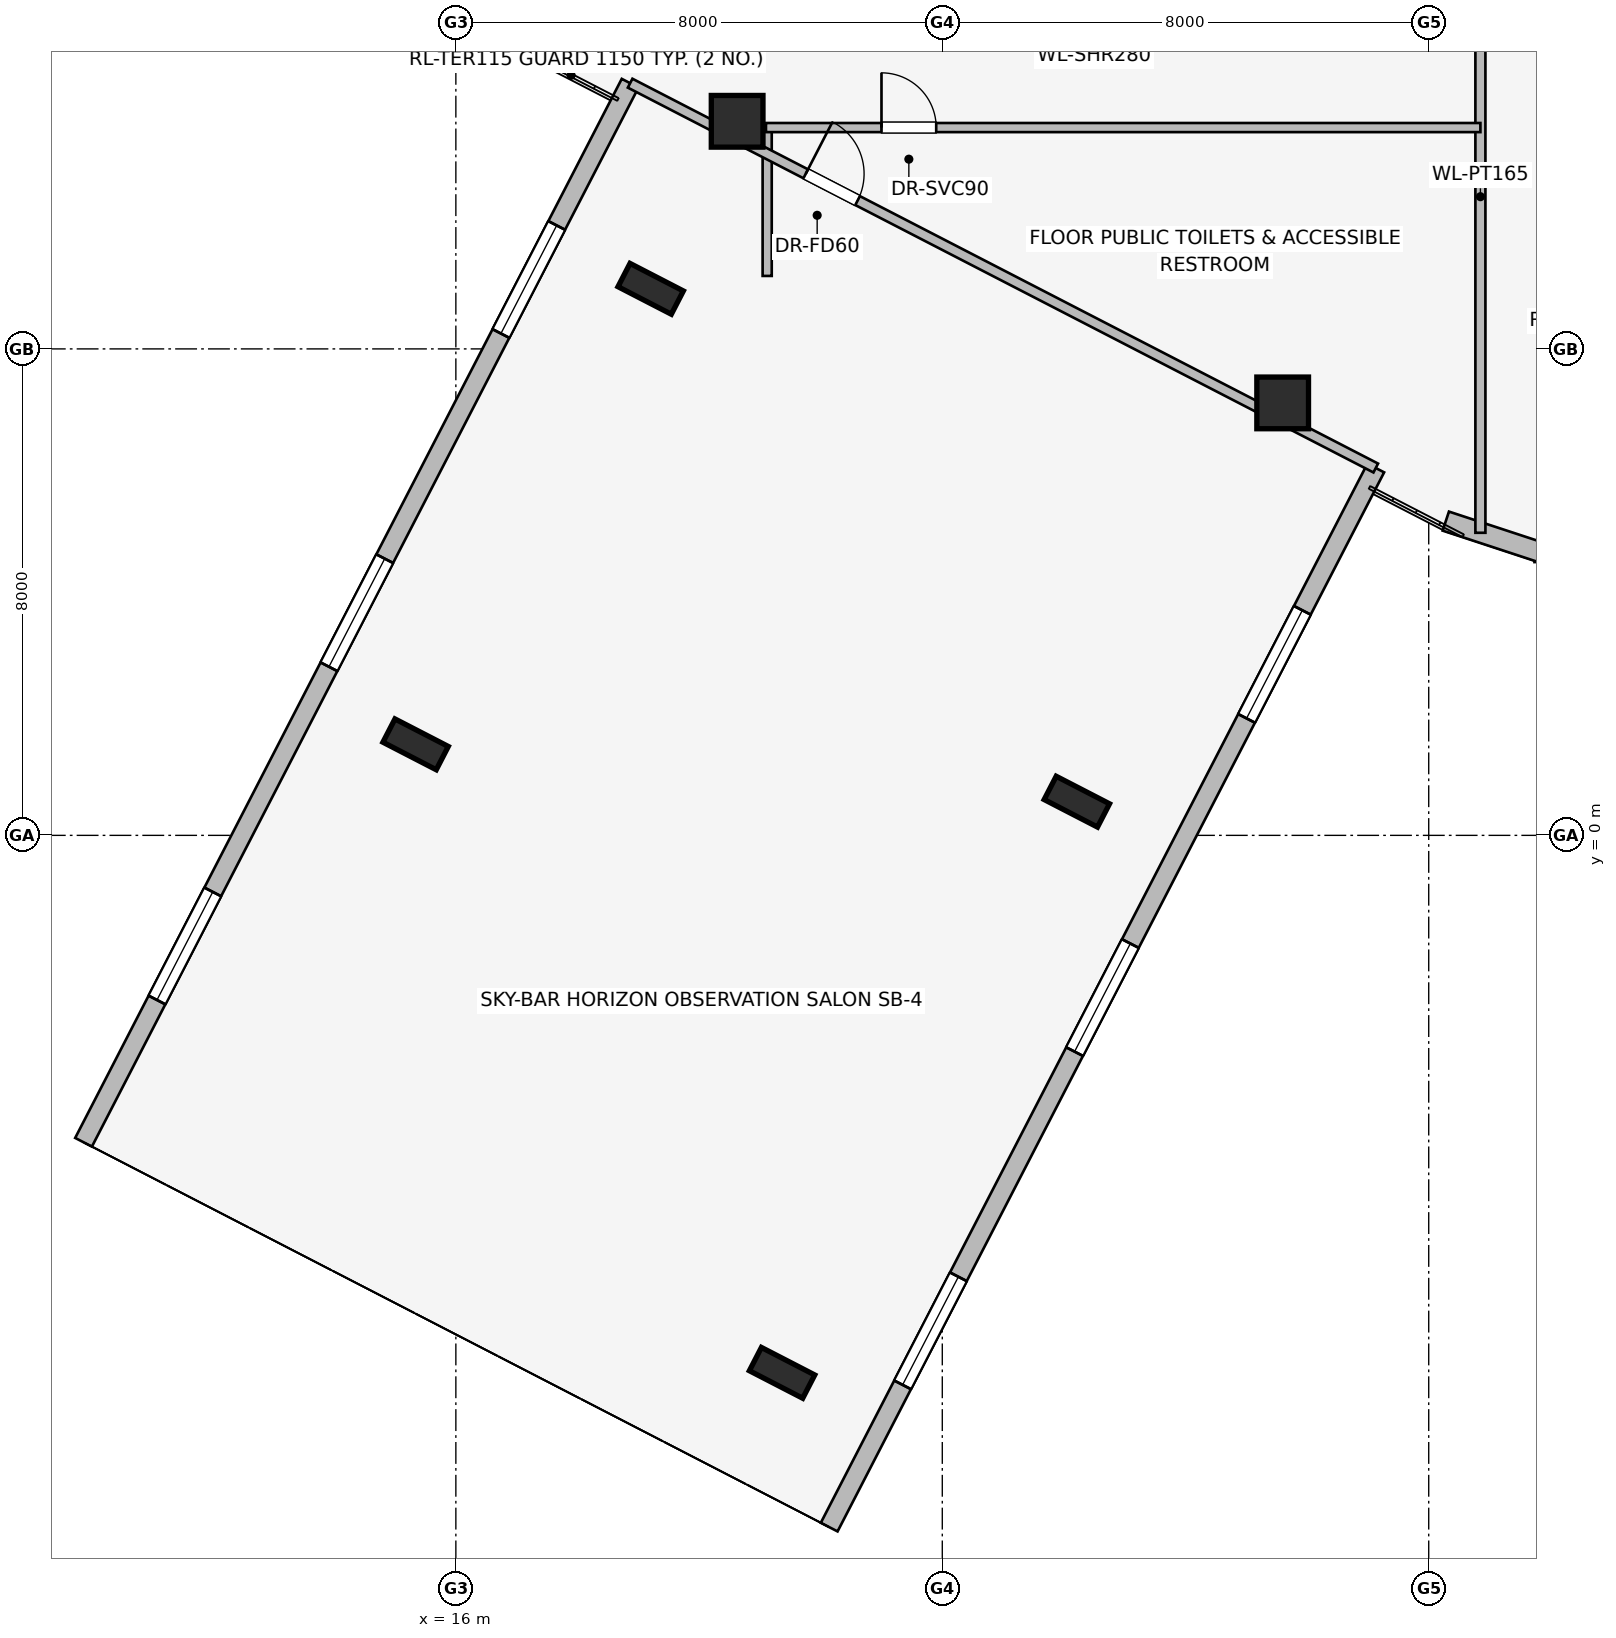
"""IFC4 building model, lengths in metres.
Left out: names, types, materials, properties, quantities, classifications, styles, units other than length and angle.
Written with IfcOpenShell. Run it as: python <this file> out.ifc"""

import sys

from ifc_helpers import new_model, si_unit, direction, frame, frame_2d, origin, origin_2d, place, context, subcontext, project, spatial, rectangle, i_section, extrude, element, fill, save


model = new_model("IFC4")
c1 = context("Model", 3, precision=1e-05, world=origin(), true_north=direction((0.0, 1.0)))
c2 = subcontext(c1, "Body", "Model", "MODEL_VIEW")
j1 = project(units=[si_unit("LENGTHUNIT", "METRE"), si_unit("PLANEANGLEUNIT", "RADIAN")], contexts=[c1])
p1 = place(None, origin())
s1 = spatial("IfcSite", under=j1, at=p1, CompositionType="ELEMENT")
p2 = place(p1, origin())
s2 = spatial("IfcBuilding", under=s1, at=p2, CompositionType="ELEMENT")
p3 = place(p2, frame((0.0, 0.0, 180.9)))
s3 = spatial("IfcBuildingStorey", under=s2, at=p3, CompositionType="ELEMENT", Elevation=180.9)
for number, where, z_axis, x_axis in (
    (1, (20.626, 11.743, 0.0), (0.0, 0.0, 1.0), (1.0, 0.0, 0.0)),
    (2, (29.598, 7.112, 0.0), (0.0, 0.0, 1.0), (1.0, 0.0, 0.0)),
):
    element("IfcColumn", number, at=place(p3, frame(where, z_axis=z_axis, x_axis=x_axis)), inside=s3, PredefinedType="COLUMN", context=c2, shape_type="SweptSolid", body=[
        extrude(rectangle(XDim=0.85, YDim=0.85, at=origin_2d()), origin(), (0.0, 0.0, 1.0), 3.45),
    ])
for number, where, z_axis, x_axis in (
    (3, (19.204, 8.988, 0.0), (0.0, 0.0, 1.0), (-0.459, -0.889, 0.0)),
    (4, (26.213, 0.554, 0.0), (0.0, 0.0, 1.0), (-0.459, -0.889, 0.0)),
    (5, (15.338, 1.497, 0.0), (0.0, 0.0, 1.0), (-0.459, -0.889, 0.0)),
    (6, (21.365, -8.839, 0.0), (0.0, 0.0, 1.0), (-0.459, -0.889, 0.0)),
):
    element("IfcColumn", number, at=place(p3, frame(where, z_axis=z_axis, x_axis=x_axis)), inside=s3, PredefinedType="COLUMN", context=c2, shape_type="SweptSolid", body=[
        extrude(i_section(OverallWidth=0.431, OverallDepth=0.987, WebThickness=0.034, FlangeThickness=0.062, at=origin_2d()), origin(), (0.0, 0.0, 1.0), 3.45),
    ])
p4 = place(p3, frame((17.489, 12.8, 0.0), z_axis=(0.0, 0.0, 1.0), x_axis=(-0.791409877269, 0.611285862884, 0.0)))
e7 = element("IfcWall", 7, at=p4, inside=s3, PredefinedType="STANDARD", context=c2, shape_type="SweptSolid", body=[
    extrude(rectangle(XDim=1.677, YDim=0.33, at=frame_2d((0.838, 0.0))), origin(), (0.0, 0.0, 1.0), 3.19),
])
p5 = place(p3, frame((9.877, -5.047, 0.0), z_axis=(0.0, 0.0, 1.0), x_axis=(0.458621661341, 0.888631628825, 0.0)))
e8 = element("IfcWall", 8, at=p5, inside=s3, PredefinedType="STANDARD", context=c2, shape_type="SweptSolid", body=[
    extrude(rectangle(XDim=19.6, YDim=0.31, at=frame_2d((9.8, 0.0))), origin(), (0.0, 0.0, 1.0), 3.19),
])
p6 = place(p5, frame((2.633, 0.0, 0.75)))
e9 = element("IfcOpeningElement", 9, at=p6, cuts=e8, PredefinedType="OPENING", context=c2, shape_type="SweptSolid", body=[
    extrude(rectangle(XDim=2.0, YDim=1.5, at=frame_2d((1.0, 0.75))), frame((0.0, 0.165, 0.0), z_axis=(0.0, -1.0, 0.0), x_axis=(1.0, 0.0, 0.0)), (0.0, 0.0, 1.0), 0.33),
])
p7 = place(p5, frame((8.8, 0.0, 0.75)))
e10 = element("IfcOpeningElement", 10, at=p7, cuts=e8, PredefinedType="OPENING", context=c2, shape_type="SweptSolid", body=[
    extrude(rectangle(XDim=2.0, YDim=1.5, at=frame_2d((1.0, 0.75))), frame((0.0, 0.165, 0.0), z_axis=(0.0, -1.0, 0.0), x_axis=(1.0, 0.0, 0.0)), (0.0, 0.0, 1.0), 0.33),
])
p8 = place(p5, frame((14.967, 0.0, 0.75)))
e11 = element("IfcOpeningElement", 11, at=p8, cuts=e8, PredefinedType="OPENING", context=c2, shape_type="SweptSolid", body=[
    extrude(rectangle(XDim=2.0, YDim=1.5, at=frame_2d((1.0, 0.75))), frame((0.0, 0.165, 0.0), z_axis=(0.0, -1.0, 0.0), x_axis=(1.0, 0.0, 0.0)), (0.0, 0.0, 1.0), 0.33),
])
p9 = place(p3, frame((31.129, 6.041, 0.0), z_axis=(0.0, 0.0, 1.0), x_axis=(-0.458626737826, -0.88862900884, 0.0)))
e12 = element("IfcWall", 12, at=p9, inside=s3, PredefinedType="STANDARD", context=c2, shape_type="SweptSolid", body=[
    extrude(rectangle(XDim=19.6, YDim=0.31, at=frame_2d((9.8, 0.0))), origin(), (0.0, 0.0, 1.0), 3.19),
])
p10 = place(p9, frame((2.633, 0.0, 0.75)))
e13 = element("IfcOpeningElement", 13, at=p10, cuts=e12, PredefinedType="OPENING", context=c2, shape_type="SweptSolid", body=[
    extrude(rectangle(XDim=2.0, YDim=1.5, at=frame_2d((1.0, 0.75))), frame((0.0, 0.165, 0.0), z_axis=(0.0, -1.0, 0.0), x_axis=(1.0, 0.0, 0.0)), (0.0, 0.0, 1.0), 0.33),
])
p11 = place(p9, frame((8.8, 0.0, 0.75)))
e14 = element("IfcOpeningElement", 14, at=p11, cuts=e12, PredefinedType="OPENING", context=c2, shape_type="SweptSolid", body=[
    extrude(rectangle(XDim=2.0, YDim=1.5, at=frame_2d((1.0, 0.75))), frame((0.0, 0.165, 0.0), z_axis=(0.0, -1.0, 0.0), x_axis=(1.0, 0.0, 0.0)), (0.0, 0.0, 1.0), 0.33),
])
p12 = place(p9, frame((14.967, 0.0, 0.75)))
e15 = element("IfcOpeningElement", 15, at=p12, cuts=e12, PredefinedType="OPENING", context=c2, shape_type="SweptSolid", body=[
    extrude(rectangle(XDim=2.0, YDim=1.5, at=frame_2d((1.0, 0.75))), frame((0.0, 0.165, 0.0), z_axis=(0.0, -1.0, 0.0), x_axis=(1.0, 0.0, 0.0)), (0.0, 0.0, 1.0), 0.33),
])
p13 = place(p3, frame((35.461, 4.659, 0.0), z_axis=(0.0, 0.0, 1.0), x_axis=(-1.0, 0.0, 0.0)))
e16 = element("IfcWall", 16, at=p13, inside=s3, PredefinedType="STANDARD", context=c2, shape_type="SweptSolid", body=[
    extrude(rectangle(XDim=1.722, YDim=0.33, at=frame_2d((0.861, 0.0))), origin(), (0.0, 0.0, 1.0), 3.19),
])
p14 = place(p3, frame((33.917, 4.63, 0.0), z_axis=(0.0, 0.0, 1.0), x_axis=(-0.949937416267, 0.312440242569, 0.0)))
e17 = element("IfcWall", 17, at=p14, inside=s3, PredefinedType="STANDARD", context=c2, shape_type="SweptSolid", body=[
    extrude(rectangle(XDim=1.722, YDim=0.33, at=frame_2d((0.861, 0.0))), origin(), (0.0, 0.0, 1.0), 3.19),
])
p15 = place(p3, frame((21.12, 9.2, 0.0), z_axis=(0.0, 0.0, 1.0), x_axis=(0.0, 1.0, 0.0)))
e18 = element("IfcWall", 18, at=p15, inside=s3, PredefinedType="PARTITIONING", context=c2, shape_type="SweptSolid", body=[
    extrude(rectangle(XDim=2.48, YDim=0.15, at=frame_2d((1.24, 0.0))), origin(), (0.0, 0.0, 1.0), 3.19),
])
p16 = place(p3, frame((32.85, 4.976, 0.0), z_axis=(0.0, 0.0, 1.0), x_axis=(0.0, 1.0, 0.0)))
e19 = element("IfcWall", 19, at=p16, inside=s3, PredefinedType="PARTITIONING", context=c2, shape_type="SweptSolid", body=[
    extrude(rectangle(XDim=11.054, YDim=0.165, at=frame_2d((5.527, 0.0))), origin(), (0.0, 0.0, 1.0), 3.19),
])
p17 = place(p3, frame((21.1, 11.64, 0.0), z_axis=(0.0, 0.0, 1.0), x_axis=(1.0, 0.0, 0.0)))
e20 = element("IfcWall", 20, at=p17, inside=s3, PredefinedType="PARTITIONING", context=c2, shape_type="SweptSolid", body=[
    extrude(rectangle(XDim=11.75, YDim=0.15, at=frame_2d((5.875, 0.0))), origin(), (0.0, 0.0, 1.0), 3.19),
])
p18 = place(p17, frame((1.9, 0.0, 0.0)))
e21 = element("IfcOpeningElement", 21, at=p18, cuts=e20, PredefinedType="OPENING", context=c2, shape_type="SweptSolid", body=[
    extrude(rectangle(XDim=0.9, YDim=2.0, at=frame_2d((0.45, 1.0))), frame((0.0, 0.085, 0.0), z_axis=(0.0, -1.0, 0.0), x_axis=(1.0, 0.0, 0.0)), (0.0, 0.0, 1.0), 0.17),
])
p19 = place(p3, frame((18.866, 12.37, 0.0), z_axis=(0.0, 0.0, 1.0), x_axis=(0.888625308836, -0.458633906832, 0.0)))
e22 = element("IfcWall", 22, at=p19, inside=s3, PredefinedType="PARTITIONING", context=c2, shape_type="SweptSolid", body=[
    extrude(rectangle(XDim=13.8, YDim=0.165, at=frame_2d((6.9, 0.0))), origin(), (0.0, 0.0, 1.0), 2.641),
])
p20 = place(p19, frame((3.25, 0.0, 0.0)))
e23 = element("IfcOpeningElement", 23, at=p20, cuts=e22, PredefinedType="OPENING", context=c2, shape_type="SweptSolid", body=[
    extrude(rectangle(XDim=0.96, YDim=2.0, at=frame_2d((0.48, 1.0))), frame((0.0, 0.093, 0.0), z_axis=(0.0, -1.0, 0.0), x_axis=(1.0, 0.0, 0.0)), (0.0, 0.0, 1.0), 0.185),
])
p21 = place(p6, origin())
e24 = element("IfcWindow", 24, at=p21, inside=s3, PartitioningType="SINGLE_PANEL", PredefinedType="WINDOW", context=c2, shape_type="SweptSolid", body=[
    extrude(rectangle(XDim=2.0, YDim=1.5, at=frame_2d((1.0, 0.75))), frame((0.0, 0.03, 0.0), z_axis=(0.0, -1.0, 0.0), x_axis=(1.0, 0.0, 0.0)), (0.0, 0.0, 1.0), 0.06),
])
fill(e9, e24)
p22 = place(p7, origin())
e25 = element("IfcWindow", 25, at=p22, inside=s3, PartitioningType="SINGLE_PANEL", PredefinedType="WINDOW", context=c2, shape_type="SweptSolid", body=[
    extrude(rectangle(XDim=2.0, YDim=1.5, at=frame_2d((1.0, 0.75))), frame((0.0, 0.03, 0.0), z_axis=(0.0, -1.0, 0.0), x_axis=(1.0, 0.0, 0.0)), (0.0, 0.0, 1.0), 0.06),
])
fill(e10, e25)
p23 = place(p8, origin())
e26 = element("IfcWindow", 26, at=p23, inside=s3, PartitioningType="SINGLE_PANEL", PredefinedType="WINDOW", context=c2, shape_type="SweptSolid", body=[
    extrude(rectangle(XDim=2.0, YDim=1.5, at=frame_2d((1.0, 0.75))), frame((0.0, 0.03, 0.0), z_axis=(0.0, -1.0, 0.0), x_axis=(1.0, 0.0, 0.0)), (0.0, 0.0, 1.0), 0.06),
])
fill(e11, e26)
p24 = place(p10, origin())
e27 = element("IfcWindow", 27, at=p24, inside=s3, PartitioningType="SINGLE_PANEL", PredefinedType="WINDOW", context=c2, shape_type="SweptSolid", body=[
    extrude(rectangle(XDim=2.0, YDim=1.5, at=frame_2d((1.0, 0.75))), frame((0.0, 0.03, 0.0), z_axis=(0.0, -1.0, 0.0), x_axis=(1.0, 0.0, 0.0)), (0.0, 0.0, 1.0), 0.06),
])
fill(e13, e27)
p25 = place(p11, origin())
e28 = element("IfcWindow", 28, at=p25, inside=s3, PartitioningType="SINGLE_PANEL", PredefinedType="WINDOW", context=c2, shape_type="SweptSolid", body=[
    extrude(rectangle(XDim=2.0, YDim=1.5, at=frame_2d((1.0, 0.75))), frame((0.0, 0.03, 0.0), z_axis=(0.0, -1.0, 0.0), x_axis=(1.0, 0.0, 0.0)), (0.0, 0.0, 1.0), 0.06),
])
fill(e14, e28)
p26 = place(p12, origin())
e29 = element("IfcWindow", 29, at=p26, inside=s3, PartitioningType="SINGLE_PANEL", PredefinedType="WINDOW", context=c2, shape_type="SweptSolid", body=[
    extrude(rectangle(XDim=2.0, YDim=1.5, at=frame_2d((1.0, 0.75))), frame((0.0, 0.03, 0.0), z_axis=(0.0, -1.0, 0.0), x_axis=(1.0, 0.0, 0.0)), (0.0, 0.0, 1.0), 0.06),
])
fill(e15, e29)
p27 = place(p18, origin())
e30 = element("IfcDoor", 30, at=p27, inside=s3, OperationType="SINGLE_SWING_LEFT", PredefinedType="DOOR", context=c2, shape_type="SweptSolid", body=[
    extrude(rectangle(XDim=0.9, YDim=2.0, at=frame_2d((0.45, 1.0))), frame((0.0, 0.025, 0.0), z_axis=(0.0, -1.0, 0.0), x_axis=(1.0, 0.0, 0.0)), (0.0, 0.0, 1.0), 0.05),
])
fill(e21, e30)
p28 = place(p20, origin())
e31 = element("IfcDoor", 31, at=p28, inside=s3, OperationType="SINGLE_SWING_LEFT", PredefinedType="DOOR", context=c2, shape_type="SweptSolid", body=[
    extrude(rectangle(XDim=0.96, YDim=2.0, at=frame_2d((0.48, 1.0))), frame((0.0, 0.025, 0.0), z_axis=(0.0, -1.0, 0.0), x_axis=(1.0, 0.0, 0.0)), (0.0, 0.0, 1.0), 0.05),
])
fill(e23, e31)
save(model, sys.argv[1])
